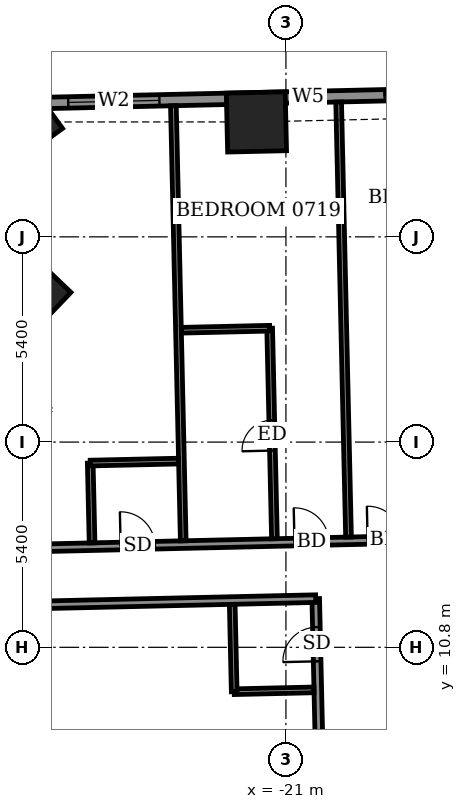
"""IFC4 building model, lengths in metres.
Left out: names, types, materials, properties, quantities, classifications, styles, units other than length and angle.
Written with IfcOpenShell. Run it as: python <this file> out.ifc"""

import sys

from ifc_helpers import new_model, si_unit, direction, frame, frame_2d, origin, origin_2d, place, context, subcontext, project, spatial, rectangle, extrude, element, fill, save


model = new_model("IFC4")
c1 = context("Model", 3, precision=1e-05, world=origin(), true_north=direction((0.0, 1.0)))
c2 = subcontext(c1, "Body", "Model", "MODEL_VIEW")
j1 = project(units=[si_unit("LENGTHUNIT", "METRE"), si_unit("PLANEANGLEUNIT", "RADIAN")], contexts=[c1])
p1 = place(None, origin())
s1 = spatial("IfcSite", under=j1, at=p1, CompositionType="ELEMENT")
p2 = place(p1, origin())
s2 = spatial("IfcBuilding", under=s1, at=p2, CompositionType="ELEMENT")
p3 = place(p2, frame((0.0, 0.0, 34.1)))
s3 = spatial("IfcBuildingStorey", under=s2, at=p3, CompositionType="ELEMENT", Elevation=34.1)
for number, where, z_axis, x_axis in (
    (1, (-21.776, 24.624, -0.55), (0.0, 0.0, 1.0), (-1.0, -0.023, 0.0)),
    (2, (-27.961, 24.623, -0.55), (0.0, 0.0, 1.0), (-0.808, -0.589, 0.0)),
    (3, (-27.753, 20.115, -0.55), (0.0, 0.0, 1.0), (-0.691, -0.723, 0.0)),
):
    element("IfcColumn", number, at=place(p3, frame(where, z_axis=z_axis, x_axis=x_axis)), inside=s3, PredefinedType="COLUMN", context=c2, shape_type="SweptSolid", body=[
        extrude(rectangle(XDim=1.55, YDim=1.55, at=origin_2d()), origin(), (0.0, 0.0, 1.0), 3.6),
    ])
p4 = place(p3, frame((24.423, 26.298, 0.0), z_axis=(0.0, 0.0, 1.0), x_axis=(-0.999742433108, -0.022695097355, 0.0)))
e4 = element("IfcWall", 4, at=p4, inside=s3, PredefinedType="SOLIDWALL", context=c2, shape_type="SweptSolid", body=[
    extrude(rectangle(XDim=52.701, YDim=0.3, at=frame_2d((26.35, 0.0))), origin(), (0.0, 0.0, 1.0), 3.05),
])
p5 = place(p4, frame((2.357, 0.0, 0.0)))
e5 = element("IfcOpeningElement", 5, at=p5, cuts=e4, PredefinedType="OPENING", context=c2, shape_type="SweptSolid", body=[
    extrude(rectangle(XDim=1.5, YDim=2.4, at=frame_2d((0.75, 1.2))), frame((0.0, 0.16, 0.0), z_axis=(0.0, -1.0, 0.0), x_axis=(1.0, 0.0, 0.0)), (0.0, 0.0, 1.0), 0.32),
])
p6 = place(p4, frame((7.475, 0.0, 0.0)))
e6 = element("IfcOpeningElement", 6, at=p6, cuts=e4, PredefinedType="OPENING", context=c2, shape_type="SweptSolid", body=[
    extrude(rectangle(XDim=1.5, YDim=2.4, at=frame_2d((0.75, 1.2))), frame((0.0, 0.16, 0.0), z_axis=(0.0, -1.0, 0.0), x_axis=(1.0, 0.0, 0.0)), (0.0, 0.0, 1.0), 0.32),
])
p7 = place(p4, frame((10.262, 0.0, 0.0)))
e7 = element("IfcOpeningElement", 7, at=p7, cuts=e4, PredefinedType="OPENING", context=c2, shape_type="SweptSolid", body=[
    extrude(rectangle(XDim=1.5, YDim=2.4, at=frame_2d((0.75, 1.2))), frame((0.0, 0.16, 0.0), z_axis=(0.0, -1.0, 0.0), x_axis=(1.0, 0.0, 0.0)), (0.0, 0.0, 1.0), 0.32),
])
p8 = place(p4, frame((15.1, 0.0, 0.0)))
e8 = element("IfcOpeningElement", 8, at=p8, cuts=e4, PredefinedType="OPENING", context=c2, shape_type="SweptSolid", body=[
    extrude(rectangle(XDim=1.5, YDim=2.4, at=frame_2d((0.75, 1.2))), frame((0.0, 0.16, 0.0), z_axis=(0.0, -1.0, 0.0), x_axis=(1.0, 0.0, 0.0)), (0.0, 0.0, 1.0), 0.32),
])
p9 = place(p4, frame((20.7, 0.0, 0.0)))
e9 = element("IfcOpeningElement", 9, at=p9, cuts=e4, PredefinedType="OPENING", context=c2, shape_type="SweptSolid", body=[
    extrude(rectangle(XDim=1.2, YDim=2.4, at=frame_2d((0.6, 1.2))), frame((0.0, 0.16, 0.0), z_axis=(0.0, -1.0, 0.0), x_axis=(1.0, 0.0, 0.0)), (0.0, 0.0, 1.0), 0.32),
])
p10 = place(p4, frame((23.337, 0.0, 0.0)))
e10 = element("IfcOpeningElement", 10, at=p10, cuts=e4, PredefinedType="OPENING", context=c2, shape_type="SweptSolid", body=[
    extrude(rectangle(XDim=1.5, YDim=2.4, at=frame_2d((0.75, 1.2))), frame((0.0, 0.16, 0.0), z_axis=(0.0, -1.0, 0.0), x_axis=(1.0, 0.0, 0.0)), (0.0, 0.0, 1.0), 0.32),
])
p11 = place(p4, frame((28.238, 0.0, 0.0)))
e11 = element("IfcOpeningElement", 11, at=p11, cuts=e4, PredefinedType="OPENING", context=c2, shape_type="SweptSolid", body=[
    extrude(rectangle(XDim=1.5, YDim=2.4, at=frame_2d((0.75, 1.2))), frame((0.0, 0.16, 0.0), z_axis=(0.0, -1.0, 0.0), x_axis=(1.0, 0.0, 0.0)), (0.0, 0.0, 1.0), 0.32),
])
p12 = place(p4, frame((33.9, 0.0, 0.0)))
e12 = element("IfcOpeningElement", 12, at=p12, cuts=e4, PredefinedType="OPENING", context=c2, shape_type="SweptSolid", body=[
    extrude(rectangle(XDim=1.2, YDim=2.4, at=frame_2d((0.6, 1.2))), frame((0.0, 0.16, 0.0), z_axis=(0.0, -1.0, 0.0), x_axis=(1.0, 0.0, 0.0)), (0.0, 0.0, 1.0), 0.32),
])
p13 = place(p4, frame((36.538, 0.0, 0.0)))
e13 = element("IfcOpeningElement", 13, at=p13, cuts=e4, PredefinedType="OPENING", context=c2, shape_type="SweptSolid", body=[
    extrude(rectangle(XDim=1.5, YDim=2.4, at=frame_2d((0.75, 1.2))), frame((0.0, 0.16, 0.0), z_axis=(0.0, -1.0, 0.0), x_axis=(1.0, 0.0, 0.0)), (0.0, 0.0, 1.0), 0.32),
])
p14 = place(p4, frame((41.338, 0.0, 0.0)))
e14 = element("IfcOpeningElement", 14, at=p14, cuts=e4, PredefinedType="OPENING", context=c2, shape_type="SweptSolid", body=[
    extrude(rectangle(XDim=1.5, YDim=2.4, at=frame_2d((0.75, 1.2))), frame((0.0, 0.16, 0.0), z_axis=(0.0, -1.0, 0.0), x_axis=(1.0, 0.0, 0.0)), (0.0, 0.0, 1.0), 0.32),
])
p15 = place(p4, frame((44.4, 0.0, 0.9)))
e15 = element("IfcOpeningElement", 15, at=p15, cuts=e4, PredefinedType="OPENING", context=c2, shape_type="SweptSolid", body=[
    extrude(rectangle(XDim=0.9, YDim=1.5, at=frame_2d((0.45, 0.75))), frame((0.0, 0.16, 0.0), z_axis=(0.0, -1.0, 0.0), x_axis=(1.0, 0.0, 0.0)), (0.0, 0.0, 1.0), 0.32),
])
p16 = place(p4, frame((48.764, 0.0, 0.9)))
e16 = element("IfcOpeningElement", 16, at=p16, cuts=e4, PredefinedType="OPENING", context=c2, shape_type="SweptSolid", body=[
    extrude(rectangle(XDim=2.4, YDim=1.5, at=frame_2d((1.2, 0.75))), frame((0.0, 0.16, 0.0), z_axis=(0.0, -1.0, 0.0), x_axis=(1.0, 0.0, 0.0)), (0.0, 0.0, 1.0), 0.32),
])
p17 = place(p3, frame((-28.446, 26.548, 0.0), z_axis=(0.0, 0.0, 1.0), x_axis=(0.999743608889, 0.022643243723, 0.0)))
e17 = element("IfcWall", 17, at=p17, inside=s3, PredefinedType="USERDEFINED", context=c2, shape_type="SweptSolid", body=[
    extrude(rectangle(XDim=2.199, YDim=0.55, at=frame_2d((1.1, 0.0))), origin(), (0.0, 0.0, 1.0), 0.8),
])
p18 = place(p3, frame((-19.589, -15.562, 0.0), z_axis=(0.0, 0.0, 1.0), x_axis=(-0.02267447203, 0.999742901109, 0.0)))
e18 = element("IfcWall", 18, at=p18, inside=s3, PredefinedType="PARTITIONING", context=c2, shape_type="SweptSolid", body=[
    extrude(rectangle(XDim=27.65, YDim=0.2, at=frame_2d((13.825, 0.0))), origin(), (0.0, 0.0, 1.0), 3.05),
])
p19 = place(p18, frame((22.313, 0.0, 0.0)))
e19 = element("IfcOpeningElement", 19, at=p19, cuts=e18, PredefinedType="OPENING", context=c2, shape_type="SweptSolid", body=[
    extrude(rectangle(XDim=1.0, YDim=2.1, at=frame_2d((0.5, 1.05))), frame((0.0, 0.11, 0.0), z_axis=(0.0, -1.0, 0.0), x_axis=(1.0, 0.0, 0.0)), (0.0, 0.0, 1.0), 0.22),
])
p20 = place(p18, frame((26.0, 0.0, 0.0)))
e20 = element("IfcOpeningElement", 20, at=p20, cuts=e18, PredefinedType="OPENING", context=c2, shape_type="SweptSolid", body=[
    extrude(rectangle(XDim=0.9, YDim=2.1, at=frame_2d((0.45, 1.05))), frame((0.0, 0.11, 0.0), z_axis=(0.0, -1.0, 0.0), x_axis=(1.0, 0.0, 0.0)), (0.0, 0.0, 1.0), 0.22),
])
p21 = place(p18, frame((17.843, 0.0, 0.0)))
e21 = element("IfcOpeningElement", 21, at=p21, cuts=e18, PredefinedType="OPENING", context=c2, shape_type="SweptSolid", body=[
    extrude(rectangle(XDim=1.0, YDim=2.1, at=frame_2d((0.5, 1.05))), frame((0.0, 0.11, 0.0), z_axis=(0.0, -1.0, 0.0), x_axis=(1.0, 0.0, 0.0)), (0.0, 0.0, 1.0), 0.22),
])
p22 = place(p18, frame((13.592, 0.0, 0.0)))
e22 = element("IfcOpeningElement", 22, at=p22, cuts=e18, PredefinedType="OPENING", context=c2, shape_type="SweptSolid", body=[
    extrude(rectangle(XDim=1.0, YDim=2.1, at=frame_2d((0.5, 1.05))), frame((0.0, 0.11, 0.0), z_axis=(0.0, -1.0, 0.0), x_axis=(1.0, 0.0, 0.0)), (0.0, 0.0, 1.0), 0.22),
])
p23 = place(p18, frame((10.0, 0.0, 0.0)))
e23 = element("IfcOpeningElement", 23, at=p23, cuts=e18, PredefinedType="OPENING", context=c2, shape_type="SweptSolid", body=[
    extrude(rectangle(XDim=1.0, YDim=2.1, at=frame_2d((0.5, 1.05))), frame((0.0, 0.11, 0.0), z_axis=(0.0, -1.0, 0.0), x_axis=(1.0, 0.0, 0.0)), (0.0, 0.0, 1.0), 0.22),
])
p24 = place(p18, frame((7.475, 0.0, 0.0)))
e24 = element("IfcOpeningElement", 24, at=p24, cuts=e18, PredefinedType="OPENING", context=c2, shape_type="SweptSolid", body=[
    extrude(rectangle(XDim=0.9, YDim=2.1, at=frame_2d((0.45, 1.05))), frame((0.0, 0.11, 0.0), z_axis=(0.0, -1.0, 0.0), x_axis=(1.0, 0.0, 0.0)), (0.0, 0.0, 1.0), 0.22),
])
p25 = place(p18, frame((4.613, 0.0, 0.0)))
e25 = element("IfcOpeningElement", 25, at=p25, cuts=e18, PredefinedType="OPENING", context=c2, shape_type="SweptSolid", body=[
    extrude(rectangle(XDim=1.0, YDim=2.1, at=frame_2d((0.5, 1.05))), frame((0.0, 0.11, 0.0), z_axis=(0.0, -1.0, 0.0), x_axis=(1.0, 0.0, 0.0)), (0.0, 0.0, 1.0), 0.22),
])
p26 = place(p3, frame((-22.361, 9.632, 0.0), z_axis=(0.0, 0.0, 1.0), x_axis=(0.999740272436, 0.02279007832, 0.0)))
e26 = element("IfcWall", 26, at=p26, inside=s3, PredefinedType="PARTITIONING", context=c2, shape_type="SweptSolid", body=[
    extrude(rectangle(XDim=2.1, YDim=0.15, at=frame_2d((1.05, 0.0))), origin(), (0.0, 0.0, 1.0), 3.05),
])
p27 = place(p3, frame((-22.361, 9.632, 0.0), z_axis=(0.0, 0.0, 1.0), x_axis=(-0.022615284993, 0.999744241736, 0.0)))
e27 = element("IfcWall", 27, at=p27, inside=s3, PredefinedType="PARTITIONING", context=c2, shape_type="SweptSolid", body=[
    extrude(rectangle(XDim=2.299, YDim=0.15, at=frame_2d((1.15, 0.0))), origin(), (0.0, 0.0, 1.0), 3.05),
])
p28 = place(p3, frame((-31.313, 11.829, 0.0), z_axis=(0.0, 0.0, 1.0), x_axis=(0.999742346277, 0.022698921993, 0.0)))
e28 = element("IfcWall", 28, at=p28, inside=s3, PredefinedType="PARTITIONING", context=c2, shape_type="SweptSolid", body=[
    extrude(rectangle(XDim=11.1, YDim=0.2, at=frame_2d((5.55, 0.0))), origin(), (0.0, 0.0, 1.0), 3.05),
])
p29 = place(p3, frame((-31.347, 13.329, 0.0), z_axis=(0.0, 0.0, 1.0), x_axis=(0.999742613079, 0.022687168058, 0.0)))
e29 = element("IfcWall", 29, at=p29, inside=s3, PredefinedType="PARTITIONING", context=c2, shape_type="SweptSolid", body=[
    extrude(rectangle(XDim=58.799, YDim=0.2, at=frame_2d((29.399, 0.0))), origin(), (0.0, 0.0, 1.0), 3.05),
])
p30 = place(p29, frame((56.45, 0.0, 0.0)))
e30 = element("IfcOpeningElement", 30, at=p30, cuts=e29, PredefinedType="OPENING", context=c2, shape_type="SweptSolid", body=[
    extrude(rectangle(XDim=1.0, YDim=2.1, at=frame_2d((0.5, 1.05))), frame((0.0, 0.11, 0.0), z_axis=(0.0, -1.0, 0.0), x_axis=(1.0, 0.0, 0.0)), (0.0, 0.0, 1.0), 0.22),
])
p31 = place(p29, frame((51.85, 0.0, 0.0)))
e31 = element("IfcOpeningElement", 31, at=p31, cuts=e29, PredefinedType="OPENING", context=c2, shape_type="SweptSolid", body=[
    extrude(rectangle(XDim=0.9, YDim=2.1, at=frame_2d((0.45, 1.05))), frame((0.0, 0.11, 0.0), z_axis=(0.0, -1.0, 0.0), x_axis=(1.0, 0.0, 0.0)), (0.0, 0.0, 1.0), 0.22),
])
p32 = place(p29, frame((47.1, 0.0, 0.0)))
e32 = element("IfcOpeningElement", 32, at=p32, cuts=e29, PredefinedType="OPENING", context=c2, shape_type="SweptSolid", body=[
    extrude(rectangle(XDim=0.9, YDim=2.1, at=frame_2d((0.45, 1.05))), frame((0.0, 0.11, 0.0), z_axis=(0.0, -1.0, 0.0), x_axis=(1.0, 0.0, 0.0)), (0.0, 0.0, 1.0), 0.22),
])
p33 = place(p29, frame((45.225, 0.0, 0.0)))
e33 = element("IfcOpeningElement", 33, at=p33, cuts=e29, PredefinedType="OPENING", context=c2, shape_type="SweptSolid", body=[
    extrude(rectangle(XDim=0.9, YDim=2.1, at=frame_2d((0.45, 1.05))), frame((0.0, 0.11, 0.0), z_axis=(0.0, -1.0, 0.0), x_axis=(1.0, 0.0, 0.0)), (0.0, 0.0, 1.0), 0.22),
])
p34 = place(p29, frame((38.55, 0.0, 0.0)))
e34 = element("IfcOpeningElement", 34, at=p34, cuts=e29, PredefinedType="OPENING", context=c2, shape_type="SweptSolid", body=[
    extrude(rectangle(XDim=0.9, YDim=2.1, at=frame_2d((0.45, 1.05))), frame((0.0, 0.11, 0.0), z_axis=(0.0, -1.0, 0.0), x_axis=(1.0, 0.0, 0.0)), (0.0, 0.0, 1.0), 0.22),
])
p35 = place(p29, frame((36.625, 0.0, 0.0)))
e35 = element("IfcOpeningElement", 35, at=p35, cuts=e29, PredefinedType="OPENING", context=c2, shape_type="SweptSolid", body=[
    extrude(rectangle(XDim=0.9, YDim=2.1, at=frame_2d((0.45, 1.05))), frame((0.0, 0.11, 0.0), z_axis=(0.0, -1.0, 0.0), x_axis=(1.0, 0.0, 0.0)), (0.0, 0.0, 1.0), 0.22),
])
p36 = place(p29, frame((29.875, 0.0, 0.0)))
e36 = element("IfcOpeningElement", 36, at=p36, cuts=e29, PredefinedType="OPENING", context=c2, shape_type="SweptSolid", body=[
    extrude(rectangle(XDim=0.9, YDim=2.1, at=frame_2d((0.45, 1.05))), frame((0.0, 0.11, 0.0), z_axis=(0.0, -1.0, 0.0), x_axis=(1.0, 0.0, 0.0)), (0.0, 0.0, 1.0), 0.22),
])
p37 = place(p29, frame((27.9, 0.0, 0.0)))
e37 = element("IfcOpeningElement", 37, at=p37, cuts=e29, PredefinedType="OPENING", context=c2, shape_type="SweptSolid", body=[
    extrude(rectangle(XDim=0.9, YDim=2.1, at=frame_2d((0.45, 1.05))), frame((0.0, 0.11, 0.0), z_axis=(0.0, -1.0, 0.0), x_axis=(1.0, 0.0, 0.0)), (0.0, 0.0, 1.0), 0.22),
])
p38 = place(p29, frame((21.1, 0.0, 0.0)))
e38 = element("IfcOpeningElement", 38, at=p38, cuts=e29, PredefinedType="OPENING", context=c2, shape_type="SweptSolid", body=[
    extrude(rectangle(XDim=0.9, YDim=2.1, at=frame_2d((0.45, 1.05))), frame((0.0, 0.11, 0.0), z_axis=(0.0, -1.0, 0.0), x_axis=(1.0, 0.0, 0.0)), (0.0, 0.0, 1.0), 0.22),
])
p39 = place(p29, frame((19.175, 0.0, 0.0)))
e39 = element("IfcOpeningElement", 39, at=p39, cuts=e29, PredefinedType="OPENING", context=c2, shape_type="SweptSolid", body=[
    extrude(rectangle(XDim=0.9, YDim=2.1, at=frame_2d((0.45, 1.05))), frame((0.0, 0.11, 0.0), z_axis=(0.0, -1.0, 0.0), x_axis=(1.0, 0.0, 0.0)), (0.0, 0.0, 1.0), 0.22),
])
p40 = place(p29, frame((12.5, 0.0, 0.0)))
e40 = element("IfcOpeningElement", 40, at=p40, cuts=e29, PredefinedType="OPENING", context=c2, shape_type="SweptSolid", body=[
    extrude(rectangle(XDim=0.9, YDim=2.1, at=frame_2d((0.45, 1.05))), frame((0.0, 0.11, 0.0), z_axis=(0.0, -1.0, 0.0), x_axis=(1.0, 0.0, 0.0)), (0.0, 0.0, 1.0), 0.22),
])
p41 = place(p29, frame((10.575, 0.0, 0.0)))
e41 = element("IfcOpeningElement", 41, at=p41, cuts=e29, PredefinedType="OPENING", context=c2, shape_type="SweptSolid", body=[
    extrude(rectangle(XDim=0.9, YDim=2.1, at=frame_2d((0.45, 1.05))), frame((0.0, 0.11, 0.0), z_axis=(0.0, -1.0, 0.0), x_axis=(1.0, 0.0, 0.0)), (0.0, 0.0, 1.0), 0.22),
])
p42 = place(p29, frame((1.425, 0.0, 0.0)))
e42 = element("IfcOpeningElement", 42, at=p42, cuts=e29, PredefinedType="OPENING", context=c2, shape_type="SweptSolid", body=[
    extrude(rectangle(XDim=1.0, YDim=2.1, at=frame_2d((0.5, 1.05))), frame((0.0, 0.11, 0.0), z_axis=(0.0, -1.0, 0.0), x_axis=(1.0, 0.0, 0.0)), (0.0, 0.0, 1.0), 0.22),
])
p43 = place(p29, frame((6.0, 0.0, 0.0)))
e43 = element("IfcOpeningElement", 43, at=p43, cuts=e29, PredefinedType="OPENING", context=c2, shape_type="SweptSolid", body=[
    extrude(rectangle(XDim=0.9, YDim=2.1, at=frame_2d((0.45, 1.05))), frame((0.0, 0.11, 0.0), z_axis=(0.0, -1.0, 0.0), x_axis=(1.0, 0.0, 0.0)), (0.0, 0.0, 1.0), 0.22),
])
p44 = place(p3, frame((-26.101, 13.548, 0.0), z_axis=(0.0, 0.0, 1.0), x_axis=(-0.022782133344, 0.999740453518, 0.0)))
e44 = element("IfcWall", 44, at=p44, inside=s3, PredefinedType="PARTITIONING", context=c2, shape_type="SweptSolid", body=[
    extrude(rectangle(XDim=2.1, YDim=0.15, at=frame_2d((1.05, 0.0))), origin(), (0.0, 0.0, 1.0), 3.05),
])
p45 = place(p3, frame((-23.702, 13.602, 0.0), z_axis=(0.0, 0.0, 1.0), x_axis=(-0.022621153305, 0.999744108971, 0.0)))
e45 = element("IfcWall", 45, at=p45, inside=s3, PredefinedType="PARTITIONING", context=c2, shape_type="SweptSolid", body=[
    extrude(rectangle(XDim=11.451, YDim=0.15, at=frame_2d((5.726, 0.0))), origin(), (0.0, 0.0, 1.0), 2.55),
])
p46 = place(p3, frame((-21.302, 13.657, 0.0), z_axis=(0.0, 0.0, 1.0), x_axis=(-0.02273742063, 0.999741471433, 0.0)))
e46 = element("IfcWall", 46, at=p46, inside=s3, PredefinedType="PARTITIONING", context=c2, shape_type="SweptSolid", body=[
    extrude(rectangle(XDim=5.541, YDim=0.15, at=frame_2d((2.77, 0.0))), origin(), (0.0, 0.0, 1.0), 3.05),
])
p47 = place(p46, frame((2.32, 0.0, 0.0)))
e47 = element("IfcOpeningElement", 47, at=p47, cuts=e46, PredefinedType="OPENING", context=c2, shape_type="SweptSolid", body=[
    extrude(rectangle(XDim=0.8, YDim=2.1, at=frame_2d((0.4, 1.05))), frame((0.0, 0.085, 0.0), z_axis=(0.0, -1.0, 0.0), x_axis=(1.0, 0.0, 0.0)), (0.0, 0.0, 1.0), 0.17),
])
p48 = place(p3, frame((-19.353, 13.701, 0.0), z_axis=(0.0, 0.0, 1.0), x_axis=(-0.022708327922, 0.999742132674, 0.0)))
e48 = element("IfcWall", 48, at=p48, inside=s3, PredefinedType="PARTITIONING", context=c2, shape_type="SweptSolid", body=[
    extrude(rectangle(XDim=11.45, YDim=0.15, at=frame_2d((5.725, 0.0))), origin(), (0.0, 0.0, 1.0), 2.55),
])
p49 = place(p3, frame((-26.149, 15.648, 0.0), z_axis=(0.0, 0.0, 1.0), x_axis=(0.999749954681, 0.022361308448, 0.0)))
e49 = element("IfcWall", 49, at=p49, inside=s3, PredefinedType="PARTITIONING", context=c2, shape_type="SweptSolid", body=[
    extrude(rectangle(XDim=2.325, YDim=0.15, at=frame_2d((1.163, 0.0))), origin(), (0.0, 0.0, 1.0), 3.05),
])
p50 = place(p3, frame((-23.752, 19.143, 0.0), z_axis=(0.0, 0.0, 1.0), x_axis=(0.999740260747, 0.02279059109, 0.0)))
e50 = element("IfcWall", 50, at=p50, inside=s3, PredefinedType="PARTITIONING", context=c2, shape_type="SweptSolid", body=[
    extrude(rectangle(XDim=2.324, YDim=0.15, at=frame_2d((1.162, 0.0))), origin(), (0.0, 0.0, 1.0), 3.05),
])
p51 = place(p14, origin())
e51 = element("IfcDoor", 51, at=p51, inside=s3, OperationType="SLIDING_TO_LEFT", PredefinedType="DOOR", context=c2, shape_type="SweptSolid", body=[
    extrude(rectangle(XDim=1.5, YDim=2.4, at=frame_2d((0.75, 1.2))), frame((0.0, 0.025, 0.0), z_axis=(0.0, -1.0, 0.0), x_axis=(1.0, 0.0, 0.0)), (0.0, 0.0, 1.0), 0.05),
])
fill(e14, e51)
p52 = place(p15, origin())
e52 = element("IfcWindow", 52, at=p52, inside=s3, PartitioningType="SINGLE_PANEL", PredefinedType="WINDOW", context=c2, shape_type="SweptSolid", body=[
    extrude(rectangle(XDim=0.9, YDim=1.5, at=frame_2d((0.45, 0.75))), frame((0.0, 0.03, 0.0), z_axis=(0.0, -1.0, 0.0), x_axis=(1.0, 0.0, 0.0)), (0.0, 0.0, 1.0), 0.06),
])
fill(e15, e52)
p53 = place(p16, origin())
e53 = element("IfcWindow", 53, at=p53, inside=s3, PartitioningType="DOUBLE_PANEL_VERTICAL", PredefinedType="WINDOW", context=c2, shape_type="SweptSolid", body=[
    extrude(rectangle(XDim=2.4, YDim=1.5, at=frame_2d((1.2, 0.75))), frame((0.0, 0.03, 0.0), z_axis=(0.0, -1.0, 0.0), x_axis=(1.0, 0.0, 0.0)), (0.0, 0.0, 1.0), 0.06),
])
fill(e16, e53)
p54 = place(p40, origin())
e54 = element("IfcDoor", 54, at=p54, inside=s3, OperationType="SINGLE_SWING_RIGHT", PredefinedType="DOOR", context=c2, shape_type="SweptSolid", body=[
    extrude(rectangle(XDim=0.9, YDim=2.1, at=frame_2d((0.45, 1.05))), frame((0.0, 0.025, 0.0), z_axis=(0.0, -1.0, 0.0), x_axis=(1.0, 0.0, 0.0)), (0.0, 0.0, 1.0), 0.05),
])
fill(e40, e54)
p55 = place(p41, origin())
e55 = element("IfcDoor", 55, at=p55, inside=s3, OperationType="SINGLE_SWING_LEFT", PredefinedType="DOOR", context=c2, shape_type="SweptSolid", body=[
    extrude(rectangle(XDim=0.9, YDim=2.1, at=frame_2d((0.45, 1.05))), frame((0.0, 0.025, 0.0), z_axis=(0.0, -1.0, 0.0), x_axis=(1.0, 0.0, 0.0)), (0.0, 0.0, 1.0), 0.05),
])
fill(e41, e55)
p56 = place(p47, origin())
e56 = element("IfcDoor", 56, at=p56, inside=s3, OperationType="SINGLE_SWING_LEFT", PredefinedType="DOOR", context=c2, shape_type="SweptSolid", body=[
    extrude(rectangle(XDim=0.8, YDim=2.1, at=frame_2d((0.4, 1.05))), frame((0.0, 0.025, 0.0), z_axis=(0.0, -1.0, 0.0), x_axis=(1.0, 0.0, 0.0)), (0.0, 0.0, 1.0), 0.05),
])
fill(e47, e56)
p57 = place(p43, origin())
e57 = element("IfcDoor", 57, at=p57, inside=s3, OperationType="SINGLE_SWING_LEFT", PredefinedType="DOOR", context=c2, shape_type="SweptSolid", body=[
    extrude(rectangle(XDim=0.9, YDim=2.1, at=frame_2d((0.45, 1.05))), frame((0.0, 0.025, 0.0), z_axis=(0.0, -1.0, 0.0), x_axis=(1.0, 0.0, 0.0)), (0.0, 0.0, 1.0), 0.05),
])
fill(e43, e57)
p58 = place(p20, origin())
e58 = element("IfcDoor", 58, at=p58, inside=s3, OperationType="SINGLE_SWING_RIGHT", PredefinedType="DOOR", context=c2, shape_type="SweptSolid", body=[
    extrude(rectangle(XDim=0.9, YDim=2.1, at=frame_2d((0.45, 1.05))), frame((0.0, 0.025, 0.0), z_axis=(0.0, -1.0, 0.0), x_axis=(1.0, 0.0, 0.0)), (0.0, 0.0, 1.0), 0.05),
])
fill(e20, e58)
save(model, sys.argv[1])
